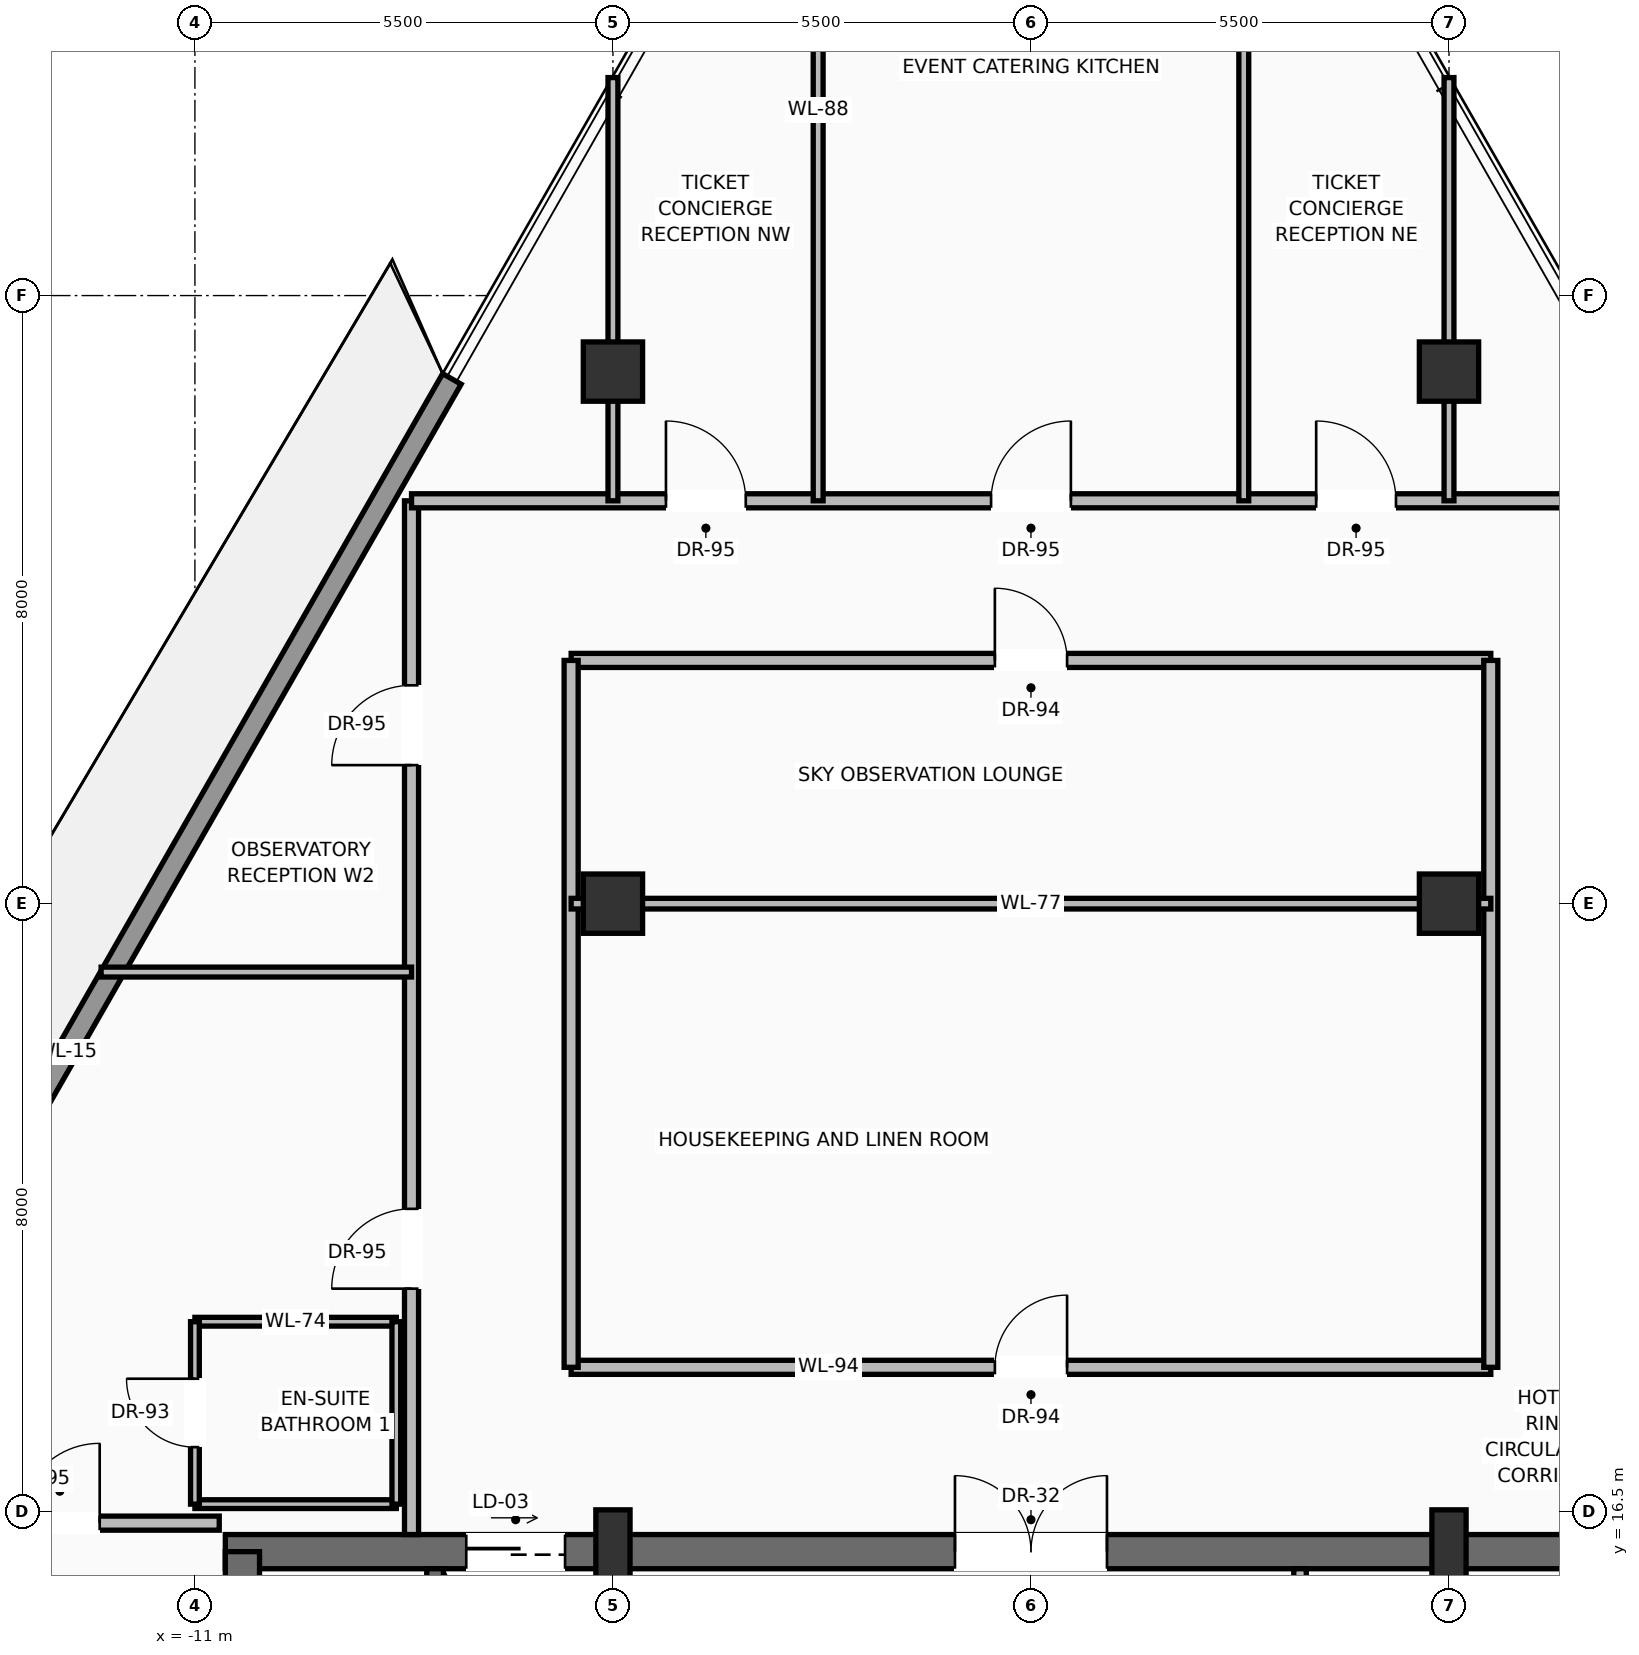
"""IFC4 building model, lengths in metres.
Left out: names, types, materials, properties, quantities, classifications, styles, units other than length and angle.
Written with IfcOpenShell. Run it as: python <this file> out.ifc"""

import sys

from ifc_helpers import new_model, si_unit, direction, frame, frame_2d, origin, origin_2d, place, context, subcontext, project, spatial, rectangle, extrude, source, transform, mapped, element, fill, save


model = new_model("IFC4")
c1 = context("Model", 3, precision=1e-05, world=origin(), true_north=direction((0.0, 1.0)))
c2 = subcontext(c1, "Body", "Model", "MODEL_VIEW")
j1 = project(units=[si_unit("LENGTHUNIT", "METRE"), si_unit("PLANEANGLEUNIT", "RADIAN")], contexts=[c1])
p1 = place(None, origin())
s1 = spatial("IfcSite", under=j1, at=p1, CompositionType="ELEMENT")
p2 = place(p1, origin())
s2 = spatial("IfcBuilding", under=s1, at=p2, CompositionType="ELEMENT")
p3 = place(p2, frame((0.0, 0.0, 300.6)))
s3 = spatial("IfcBuildingStorey", under=s2, at=p3, CompositionType="ELEMENT", Elevation=300.6)
p4 = place(p3, frame((-10.6, 15.975, 0.0), z_axis=(0.0, 0.0, 1.0), x_axis=(1.0, 0.0, 0.0)))
e1 = element("IfcWall", 1, at=p4, inside=s3, PredefinedType="SHEAR", context=c2, shape_type="SweptSolid", body=[
    extrude(rectangle(XDim=21.2, YDim=0.45, at=frame_2d((10.6, 0.0))), origin(), (0.0, 0.0, 1.0), 3.15),
])
p5 = place(p4, frame((3.17, 0.0, 0.0)))
e2 = element("IfcOpeningElement", 2, at=p5, cuts=e1, PredefinedType="OPENING", context=c2, shape_type="SweptSolid", body=[
    extrude(rectangle(XDim=1.3, YDim=2.3, at=frame_2d((0.65, 1.15))), frame((0.0, 0.235, 0.0), z_axis=(0.0, -1.0, 0.0), x_axis=(1.0, 0.0, 0.0)), (0.0, 0.0, 1.0), 0.47),
])
p6 = place(p4, frame((9.6, 0.0, 0.0)))
e3 = element("IfcOpeningElement", 3, at=p6, cuts=e1, PredefinedType="OPENING", context=c2, shape_type="SweptSolid", body=[
    extrude(rectangle(XDim=2.0, YDim=2.4, at=frame_2d((1.0, 1.2))), frame((0.0, 0.235, 0.0), z_axis=(0.0, -1.0, 0.0), x_axis=(1.0, 0.0, 0.0)), (0.0, 0.0, 1.0), 0.47),
])
p7 = place(p3, frame((-10.375, 0.625, 0.0), z_axis=(0.0, 0.0, 1.0), x_axis=(0.0, 1.0, 0.0)))
e4 = element("IfcWall", 4, at=p7, inside=s3, PredefinedType="SHEAR", context=c2, shape_type="SweptSolid", body=[
    extrude(rectangle(XDim=15.35, YDim=0.45, at=frame_2d((7.675, 0.0))), origin(), (0.0, 0.0, 1.0), 3.15),
])
p8 = place(p3, frame((-5.5, 0.625, 0.0), z_axis=(0.0, 0.0, 1.0), x_axis=(0.0, 1.0, 0.0)))
e5 = element("IfcWall", 5, at=p8, inside=s3, PredefinedType="SHEAR", context=c2, shape_type="SweptSolid", body=[
    extrude(rectangle(XDim=15.35, YDim=0.4, at=frame_2d((7.675, 0.0))), origin(), (0.0, 0.0, 1.0), 3.15),
])
p9 = place(p8, frame((8.875, 0.0, 0.0)))
e6 = element("IfcOpeningElement", 6, at=p9, cuts=e5, PredefinedType="OPENING", context=c2, shape_type="SweptSolid", body=[
    extrude(rectangle(XDim=1.1, YDim=2.2, at=frame_2d((0.55, 1.1))), frame((0.0, 0.21, 0.0), z_axis=(0.0, -1.0, 0.0), x_axis=(1.0, 0.0, 0.0)), (0.0, 0.0, 1.0), 0.42),
])
p10 = place(p3, frame((5.5, 0.625, 0.0), z_axis=(0.0, 0.0, 1.0), x_axis=(0.0, 1.0, 0.0)))
e7 = element("IfcWall", 7, at=p10, inside=s3, PredefinedType="SHEAR", context=c2, shape_type="SweptSolid", body=[
    extrude(rectangle(XDim=15.35, YDim=0.4, at=frame_2d((7.675, 0.0))), origin(), (0.0, 0.0, 1.0), 3.15),
])
p11 = place(p10, frame((8.875, 0.0, 0.0)))
e8 = element("IfcOpeningElement", 8, at=p11, cuts=e7, PredefinedType="OPENING", context=c2, shape_type="SweptSolid", body=[
    extrude(rectangle(XDim=1.1, YDim=2.2, at=frame_2d((0.55, 1.1))), frame((0.0, 0.21, 0.0), z_axis=(0.0, -1.0, 0.0), x_axis=(1.0, 0.0, 0.0)), (0.0, 0.0, 1.0), 0.42),
])
m1 = source(origin(), c2, "Body", "SweptSolid", [
    extrude(rectangle(XDim=0.45, YDim=0.95, at=origin_2d()), origin(), (0.0, 0.0, 1.0), 3.45),
])
for number, where, z_axis, x_axis in (
    (9, (-5.5, 16.05, 0.0), (0.0, 0.0, 1.0), (1.0, 0.0, 0.0)),
    (10, (5.5, 16.05, 0.0), (0.0, 0.0, 1.0), (1.0, 0.0, 0.0)),
):
    element("IfcColumn", number, at=place(p3, frame(where, z_axis=z_axis, x_axis=x_axis)), inside=s3, PredefinedType="PILASTER", context=c2, shape_type="MappedRepresentation", body=[
        mapped(m1, transform((0.0, 0.0, 0.0), scale=1.0)),
    ])
m2 = source(origin(), c2, "Body", "SweptSolid", [
    extrude(rectangle(XDim=0.78, YDim=0.78, at=origin_2d()), origin(), (0.0, 0.0, 1.0), 3.45),
])
for number, where, z_axis, x_axis in (
    (11, (-5.5, 24.5, 0.0), (0.0, 0.0, 1.0), (1.0, 0.0, 0.0)),
    (12, (5.5, 24.5, 0.0), (0.0, 0.0, 1.0), (1.0, 0.0, 0.0)),
    (13, (-5.5, 31.5, 0.0), (0.0, 0.0, 1.0), (1.0, 0.0, 0.0)),
    (14, (5.5, 31.5, 0.0), (0.0, 0.0, 1.0), (1.0, 0.0, 0.0)),
):
    element("IfcColumn", number, at=place(p3, frame(where, z_axis=z_axis, x_axis=x_axis)), inside=s3, PredefinedType="COLUMN", context=c2, shape_type="MappedRepresentation", body=[
        mapped(m2, transform((0.0, 0.0, 0.0), scale=1.0)),
    ])
p12 = place(p3, frame((-17.759, 13.683, 0.0), z_axis=(0.0, 0.0, 1.0), x_axis=(0.496660385715, 0.867944964419, 0.0)))
e15 = element("IfcWall", 15, at=p12, inside=s3, PredefinedType="SOLIDWALL", context=c2, shape_type="SweptSolid", body=[
    extrude(rectangle(XDim=20.417, YDim=0.28, at=frame_2d((10.208, 0.0))), origin(), (0.0, 0.0, 1.0), 2.73),
])
p13 = place(p12, frame((4.9, 0.0, 0.0)))
e16 = element("IfcOpeningElement", 16, at=p13, cuts=e15, PredefinedType="OPENING", context=c2, shape_type="SweptSolid", body=[
    extrude(rectangle(XDim=1.6, YDim=2.35, at=frame_2d((0.8, 1.175))), frame((0.0, 0.15, 0.0), z_axis=(0.0, -1.0, 0.0), x_axis=(1.0, 0.0, 0.0)), (0.0, 0.0, 1.0), 0.3),
])
p14 = place(p3, frame((-7.84, 11.87, 0.0), z_axis=(0.0, 0.0, 1.0), x_axis=(0.0, 1.0, 0.0)))
e17 = element("IfcWall", 17, at=p14, inside=s3, PredefinedType="SOLIDWALL", context=c2, shape_type="SweptSolid", body=[
    extrude(rectangle(XDim=3.88, YDim=0.22, at=frame_2d((1.94, 0.0))), origin(), (0.0, 0.0, 1.0), 3.15),
])
p15 = place(p3, frame((3.54, 11.22, 0.0), z_axis=(0.0, 0.0, 1.0), x_axis=(0.0, 1.0, 0.0)))
e18 = element("IfcWall", 18, at=p15, inside=s3, PredefinedType="PARTITIONING", context=c2, shape_type="SweptSolid", body=[
    extrude(rectangle(XDim=4.53, YDim=0.165, at=frame_2d((2.265, 0.0))), origin(), (0.0, 0.0, 1.0), 3.142),
])
p16 = place(p15, frame((1.25, 0.0, 0.0)))
e19 = element("IfcOpeningElement", 19, at=p16, cuts=e18, PredefinedType="OPENING", context=c2, shape_type="SweptSolid", body=[
    extrude(rectangle(XDim=0.9, YDim=2.1, at=frame_2d((0.45, 1.05))), frame((0.0, 0.093, 0.0), z_axis=(0.0, -1.0, 0.0), x_axis=(1.0, 0.0, 0.0)), (0.0, 0.0, 1.0), 0.185),
])
p17 = place(p3, frame((-6.05, 18.4, 0.0), z_axis=(0.0, 0.0, 1.0), x_axis=(1.0, 0.0, 0.0)))
e20 = element("IfcWall", 20, at=p17, inside=s3, PredefinedType="PARTITIONING", context=c2, shape_type="SweptSolid", body=[
    extrude(rectangle(XDim=12.1, YDim=0.185, at=frame_2d((6.05, 0.0))), origin(), (0.0, 0.0, 1.0), 3.142),
])
p18 = place(p17, frame((5.575, 0.0, 0.0)))
e21 = element("IfcOpeningElement", 21, at=p18, cuts=e20, PredefinedType="OPENING", context=c2, shape_type="SweptSolid", body=[
    extrude(rectangle(XDim=0.95, YDim=2.2, at=frame_2d((0.475, 1.1))), frame((0.0, 0.103, 0.0), z_axis=(0.0, -1.0, 0.0), x_axis=(1.0, 0.0, 0.0)), (0.0, 0.0, 1.0), 0.205),
])
p19 = place(p3, frame((-6.05, 27.7, 0.0), z_axis=(0.0, 0.0, 1.0), x_axis=(1.0, 0.0, 0.0)))
e22 = element("IfcWall", 22, at=p19, inside=s3, PredefinedType="PARTITIONING", context=c2, shape_type="SweptSolid", body=[
    extrude(rectangle(XDim=12.1, YDim=0.185, at=frame_2d((6.05, 0.0))), origin(), (0.0, 0.0, 1.0), 3.142),
])
p20 = place(p19, frame((5.575, 0.0, 0.0)))
e23 = element("IfcOpeningElement", 23, at=p20, cuts=e22, PredefinedType="OPENING", context=c2, shape_type="SweptSolid", body=[
    extrude(rectangle(XDim=0.95, YDim=2.2, at=frame_2d((0.475, 1.1))), frame((0.0, 0.103, 0.0), z_axis=(0.0, -1.0, 0.0), x_axis=(1.0, 0.0, 0.0)), (0.0, 0.0, 1.0), 0.205),
])
for number, where, z_axis, x_axis in (
    (24, (-6.05, 18.4, 0.0), (0.0, 0.0, 1.0), (0.0, 1.0, 0.0)),
    (25, (6.05, 18.4, 0.0), (0.0, 0.0, 1.0), (0.0, 1.0, 0.0)),
):
    element("IfcWall", number, at=place(p3, frame(where, z_axis=z_axis, x_axis=x_axis)), inside=s3, PredefinedType="PARTITIONING", context=c2, shape_type="SweptSolid", body=[
        extrude(rectangle(XDim=9.3, YDim=0.185, at=frame_2d((4.65, 0.0))), origin(), (0.0, 0.0, 1.0), 3.142),
    ])
p21 = place(p3, frame((-8.15, 16.2, 0.0), z_axis=(0.0, 0.0, 1.0), x_axis=(0.0, 1.0, 0.0)))
e26 = element("IfcWall", 26, at=p21, inside=s3, PredefinedType="PARTITIONING", context=c2, shape_type="SweptSolid", body=[
    extrude(rectangle(XDim=13.6, YDim=0.185, at=frame_2d((6.8, 0.0))), origin(), (0.0, 0.0, 1.0), 3.142),
])
p22 = place(p21, frame((3.235, 0.0, 0.0)))
e27 = element("IfcOpeningElement", 27, at=p22, cuts=e26, PredefinedType="OPENING", context=c2, shape_type="SweptSolid", body=[
    extrude(rectangle(XDim=1.05, YDim=2.25, at=frame_2d((0.525, 1.125))), frame((0.0, 0.103, 0.0), z_axis=(0.0, -1.0, 0.0), x_axis=(1.0, 0.0, 0.0)), (0.0, 0.0, 1.0), 0.205),
])
p23 = place(p21, frame((10.123, 0.0, 0.0)))
e28 = element("IfcOpeningElement", 28, at=p23, cuts=e26, PredefinedType="OPENING", context=c2, shape_type="SweptSolid", body=[
    extrude(rectangle(XDim=1.05, YDim=2.25, at=frame_2d((0.525, 1.125))), frame((0.0, 0.103, 0.0), z_axis=(0.0, -1.0, 0.0), x_axis=(1.0, 0.0, 0.0)), (0.0, 0.0, 1.0), 0.205),
])
p24 = place(p3, frame((-8.15, 29.8, 0.0), z_axis=(0.0, 0.0, 1.0), x_axis=(1.0, 0.0, 0.0)))
e29 = element("IfcWall", 29, at=p24, inside=s3, PredefinedType="PARTITIONING", context=c2, shape_type="SweptSolid", body=[
    extrude(rectangle(XDim=16.3, YDim=0.185, at=frame_2d((8.15, 0.0))), origin(), (0.0, 0.0, 1.0), 3.142),
])
p25 = place(p24, frame((3.347, 0.0, 0.0)))
e30 = element("IfcOpeningElement", 30, at=p25, cuts=e29, PredefinedType="OPENING", context=c2, shape_type="SweptSolid", body=[
    extrude(rectangle(XDim=1.05, YDim=2.25, at=frame_2d((0.525, 1.125))), frame((0.0, 0.103, 0.0), z_axis=(0.0, -1.0, 0.0), x_axis=(1.0, 0.0, 0.0)), (0.0, 0.0, 1.0), 0.205),
])
p26 = place(p24, frame((7.625, 0.0, 0.0)))
e31 = element("IfcOpeningElement", 31, at=p26, cuts=e29, PredefinedType="OPENING", context=c2, shape_type="SweptSolid", body=[
    extrude(rectangle(XDim=1.05, YDim=2.25, at=frame_2d((0.525, 1.125))), frame((0.0, 0.103, 0.0), z_axis=(0.0, -1.0, 0.0), x_axis=(1.0, 0.0, 0.0)), (0.0, 0.0, 1.0), 0.205),
])
p27 = place(p24, frame((11.903, 0.0, 0.0)))
e32 = element("IfcOpeningElement", 32, at=p27, cuts=e29, PredefinedType="OPENING", context=c2, shape_type="SweptSolid", body=[
    extrude(rectangle(XDim=1.05, YDim=2.25, at=frame_2d((0.525, 1.125))), frame((0.0, 0.103, 0.0), z_axis=(0.0, -1.0, 0.0), x_axis=(1.0, 0.0, 0.0)), (0.0, 0.0, 1.0), 0.205),
])
p28 = place(p3, frame((-6.05, 24.5, 0.0), z_axis=(0.0, 0.0, 1.0), x_axis=(1.0, 0.0, 0.0)))
e33 = element("IfcWall", 33, at=p28, inside=s3, PredefinedType="PARTITIONING", context=c2, shape_type="SweptSolid", body=[
    extrude(rectangle(XDim=12.1, YDim=0.14, at=frame_2d((6.05, 0.0))), origin(), (0.0, 0.0, 1.0), 3.142),
])
p29 = place(p3, frame((-16.383, 16.35, 0.0), z_axis=(0.0, 0.0, 1.0), x_axis=(1.0, 0.0, 0.0)))
e34 = element("IfcWall", 34, at=p29, inside=s3, PredefinedType="PARTITIONING", context=c2, shape_type="SweptSolid", body=[
    extrude(rectangle(XDim=5.703, YDim=0.185, at=frame_2d((2.852, 0.0))), origin(), (0.0, 0.0, 1.0), 3.142),
])
p30 = place(p29, frame((3.08, 0.0, 0.0)))
e35 = element("IfcOpeningElement", 35, at=p30, cuts=e34, PredefinedType="OPENING", context=c2, shape_type="SweptSolid", body=[
    extrude(rectangle(XDim=1.05, YDim=2.25, at=frame_2d((0.525, 1.125))), frame((0.0, 0.103, 0.0), z_axis=(0.0, -1.0, 0.0), x_axis=(1.0, 0.0, 0.0)), (0.0, 0.0, 1.0), 0.205),
])
for number, where, z_axis, x_axis in (
    (36, (-5.5, 29.8, 0.0), (0.0, 0.0, 1.0), (0.0, 1.0, 0.0)),
    (37, (5.5, 29.8, 0.0), (0.0, 0.0, 1.0), (0.0, 1.0, 0.0)),
):
    element("IfcWall", number, at=place(p3, frame(where, z_axis=z_axis, x_axis=x_axis)), inside=s3, PredefinedType="PARTITIONING", context=c2, shape_type="SweptSolid", body=[
        extrude(rectangle(XDim=5.568, YDim=0.13, at=frame_2d((2.784, 0.0))), origin(), (0.0, 0.0, 1.0), 2.593),
    ])
for number, where, z_axis, x_axis in (
    (38, (-2.8, 29.8, 0.0), (0.0, 0.0, 1.0), (0.0, 1.0, 0.0)),
    (39, (2.8, 29.8, 0.0), (0.0, 0.0, 1.0), (0.0, 1.0, 0.0)),
):
    element("IfcWall", number, at=place(p3, frame(where, z_axis=z_axis, x_axis=x_axis)), inside=s3, PredefinedType="PARTITIONING", context=c2, shape_type="SweptSolid", body=[
        extrude(rectangle(XDim=10.287, YDim=0.13, at=frame_2d((5.143, 0.0))), origin(), (0.0, 0.0, 1.0), 3.142),
    ])
for number, where, z_axis, x_axis in (
    (40, (-11.0, 16.6, 0.0), (0.0, 0.0, 1.0), (1.0, 0.0, 0.0)),
    (41, (-11.0, 19.0, 0.0), (0.0, 0.0, 1.0), (1.0, 0.0, 0.0)),
):
    element("IfcWall", number, at=place(p3, frame(where, z_axis=z_axis, x_axis=x_axis)), inside=s3, PredefinedType="PARTITIONING", context=c2, shape_type="SweptSolid", body=[
        extrude(rectangle(XDim=2.65, YDim=0.115, at=frame_2d((1.325, 0.0))), origin(), (0.0, 0.0, 1.0), 3.142),
    ])
p31 = place(p3, frame((-11.0, 16.6, 0.0), z_axis=(0.0, 0.0, 1.0), x_axis=(0.0, 1.0, 0.0)))
e42 = element("IfcWall", 42, at=p31, inside=s3, PredefinedType="PARTITIONING", context=c2, shape_type="SweptSolid", body=[
    extrude(rectangle(XDim=2.4, YDim=0.115, at=frame_2d((1.2, 0.0))), origin(), (0.0, 0.0, 1.0), 3.142),
])
p32 = place(p31, frame((0.75, 0.0, 0.0)))
e43 = element("IfcOpeningElement", 43, at=p32, cuts=e42, PredefinedType="OPENING", context=c2, shape_type="SweptSolid", body=[
    extrude(rectangle(XDim=0.9, YDim=2.15, at=frame_2d((0.45, 1.075))), frame((0.0, 0.067, 0.0), z_axis=(0.0, -1.0, 0.0), x_axis=(1.0, 0.0, 0.0)), (0.0, 0.0, 1.0), 0.135),
])
p33 = place(p3, frame((-8.35, 16.6, 0.0), z_axis=(0.0, 0.0, 1.0), x_axis=(0.0, 1.0, 0.0)))
e44 = element("IfcWall", 44, at=p33, inside=s3, PredefinedType="PARTITIONING", context=c2, shape_type="SweptSolid", body=[
    extrude(rectangle(XDim=2.4, YDim=0.115, at=frame_2d((1.2, 0.0))), origin(), (0.0, 0.0, 1.0), 3.142),
])
p34 = place(p3, frame((-12.234, 23.6, 0.0), z_axis=(0.0, 0.0, 1.0), x_axis=(1.0, 0.0, 0.0)))
e45 = element("IfcWall", 45, at=p34, inside=s3, PredefinedType="PARTITIONING", context=c2, shape_type="SweptSolid", body=[
    extrude(rectangle(XDim=4.084, YDim=0.13, at=frame_2d((2.042, 0.0))), origin(), (0.0, 0.0, 1.0), 3.142),
])
m3 = source(origin(), c2, "Body", "SweptSolid", [
    extrude(rectangle(XDim=1.3, YDim=2.3, at=frame_2d((0.65, 1.15))), frame((0.0, 0.025, 0.0), z_axis=(0.0, -1.0, 0.0), x_axis=(1.0, 0.0, 0.0)), (0.0, 0.0, 1.0), 0.05),
])
p35 = place(p5, origin())
e46 = element("IfcDoor", 46, at=p35, inside=s3, OperationType="SLIDING_TO_RIGHT", PredefinedType="DOOR", context=c2, shape_type="MappedRepresentation", body=[
    mapped(m3, transform((0.0, 0.0, 0.0), scale=1.0)),
])
fill(e2, e46)
m4 = source(origin(), c2, "Body", "SweptSolid", [
    extrude(rectangle(XDim=2.0, YDim=2.4, at=frame_2d((1.0, 1.2))), frame((0.0, 0.025, 0.0), z_axis=(0.0, -1.0, 0.0), x_axis=(1.0, 0.0, 0.0)), (0.0, 0.0, 1.0), 0.05),
])
p36 = place(p6, origin())
e47 = element("IfcDoor", 47, at=p36, inside=s3, OperationType="DOUBLE_DOOR_SINGLE_SWING", PredefinedType="DOOR", context=c2, shape_type="MappedRepresentation", body=[
    mapped(m4, transform((0.0, 0.0, 0.0), scale=1.0)),
])
fill(e3, e47)
m5 = source(origin(), c2, "Body", "SweptSolid", [
    extrude(rectangle(XDim=0.95, YDim=2.2, at=frame_2d((0.475, 1.1))), frame((0.0, 0.025, 0.0), z_axis=(0.0, -1.0, 0.0), x_axis=(1.0, 0.0, 0.0)), (0.0, 0.0, 1.0), 0.05),
])
p37 = place(p18, origin())
e48 = element("IfcDoor", 48, at=p37, inside=s3, OperationType="SINGLE_SWING_RIGHT", PredefinedType="DOOR", context=c2, shape_type="MappedRepresentation", body=[
    mapped(m5, transform((0.0, 0.0, 0.0), scale=1.0)),
])
fill(e21, e48)
p38 = place(p20, origin())
e49 = element("IfcDoor", 49, at=p38, inside=s3, OperationType="SINGLE_SWING_LEFT", PredefinedType="DOOR", context=c2, shape_type="MappedRepresentation", body=[
    mapped(m5, transform((0.0, 0.0, 0.0), scale=1.0)),
])
fill(e23, e49)
m6 = source(origin(), c2, "Body", "SweptSolid", [
    extrude(rectangle(XDim=1.05, YDim=2.25, at=frame_2d((0.525, 1.125))), frame((0.0, 0.025, 0.0), z_axis=(0.0, -1.0, 0.0), x_axis=(1.0, 0.0, 0.0)), (0.0, 0.0, 1.0), 0.05),
])
p39 = place(p30, origin())
e50 = element("IfcDoor", 50, at=p39, inside=s3, OperationType="SINGLE_SWING_RIGHT", PredefinedType="DOOR", context=c2, shape_type="MappedRepresentation", body=[
    mapped(m6, transform((0.0, 0.0, 0.0), scale=1.0)),
])
fill(e35, e50)
p40 = place(p22, origin())
e51 = element("IfcDoor", 51, at=p40, inside=s3, OperationType="SINGLE_SWING_LEFT", PredefinedType="DOOR", context=c2, shape_type="MappedRepresentation", body=[
    mapped(m6, transform((0.0, 0.0, 0.0), scale=1.0)),
])
fill(e27, e51)
m7 = source(origin(), c2, "Body", "SweptSolid", [
    extrude(rectangle(XDim=0.9, YDim=2.15, at=frame_2d((0.45, 1.075))), frame((0.0, 0.025, 0.0), z_axis=(0.0, -1.0, 0.0), x_axis=(1.0, 0.0, 0.0)), (0.0, 0.0, 1.0), 0.05),
])
p41 = place(p32, origin())
e52 = element("IfcDoor", 52, at=p41, inside=s3, OperationType="SINGLE_SWING_RIGHT", PredefinedType="DOOR", context=c2, shape_type="MappedRepresentation", body=[
    mapped(m7, transform((0.0, 0.0, 0.0), scale=1.0)),
])
fill(e43, e52)
p42 = place(p23, origin())
e53 = element("IfcDoor", 53, at=p42, inside=s3, OperationType="SINGLE_SWING_LEFT", PredefinedType="DOOR", context=c2, shape_type="MappedRepresentation", body=[
    mapped(m6, transform((0.0, 0.0, 0.0), scale=1.0)),
])
fill(e28, e53)
p43 = place(p25, origin())
e54 = element("IfcDoor", 54, at=p43, inside=s3, OperationType="SINGLE_SWING_LEFT", PredefinedType="DOOR", context=c2, shape_type="MappedRepresentation", body=[
    mapped(m6, transform((0.0, 0.0, 0.0), scale=1.0)),
])
fill(e30, e54)
p44 = place(p26, origin())
e55 = element("IfcDoor", 55, at=p44, inside=s3, OperationType="SINGLE_SWING_RIGHT", PredefinedType="DOOR", context=c2, shape_type="MappedRepresentation", body=[
    mapped(m6, transform((0.0, 0.0, 0.0), scale=1.0)),
])
fill(e31, e55)
p45 = place(p27, origin())
e56 = element("IfcDoor", 56, at=p45, inside=s3, OperationType="SINGLE_SWING_LEFT", PredefinedType="DOOR", context=c2, shape_type="MappedRepresentation", body=[
    mapped(m6, transform((0.0, 0.0, 0.0), scale=1.0)),
])
fill(e32, e56)
save(model, sys.argv[1])
